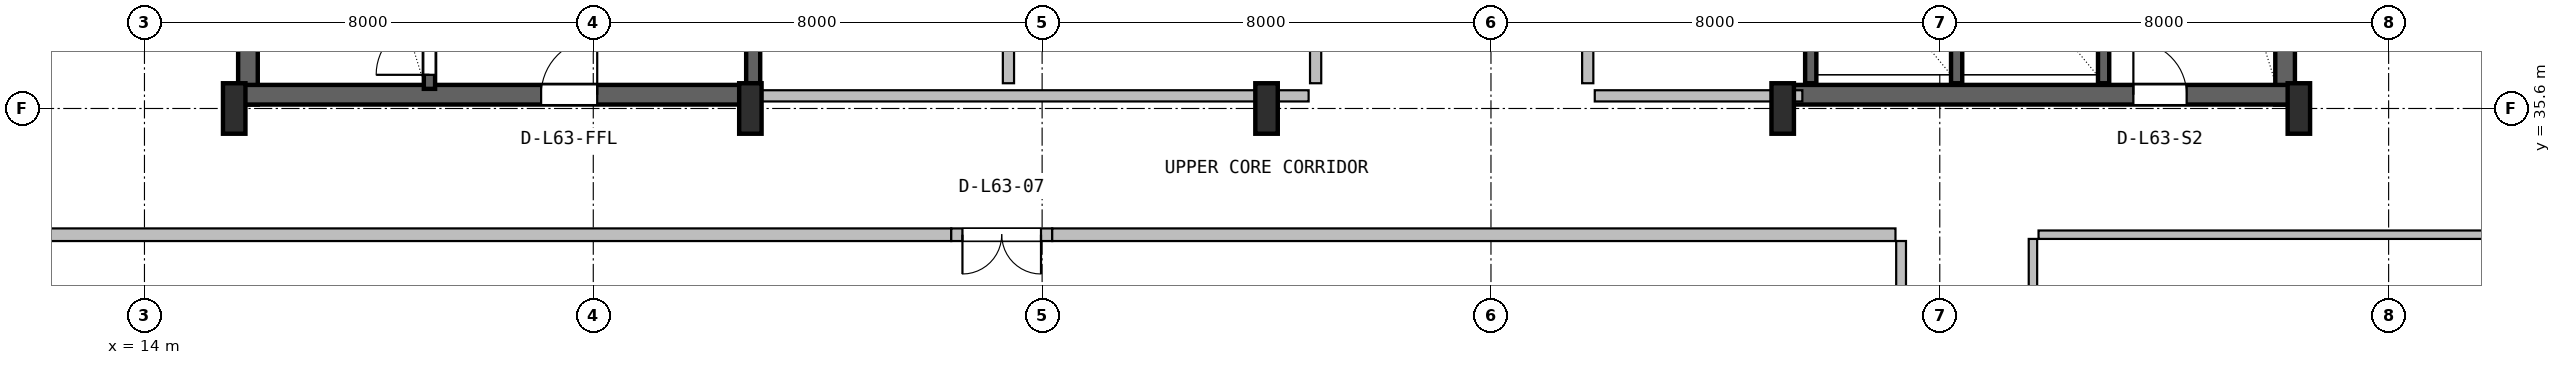
"""IFC4 building model, lengths in metres.
Left out: names, types, materials, properties, quantities, classifications, styles, units other than length and angle.
Written with IfcOpenShell. Run it as: python <this file> out.ifc"""

import sys

from ifc_helpers import new_model, si_unit, direction, frame, frame_2d, origin, origin_2d, place, context, subcontext, project, spatial, rectangle, i_section, extrude, source, transform, mapped, element, fill, save


model = new_model("IFC4")
c1 = context("Model", 3, precision=1e-05, world=origin(), true_north=direction((0.0, 1.0)))
c2 = subcontext(c1, "Body", "Model", "MODEL_VIEW")
j1 = project(units=[si_unit("LENGTHUNIT", "METRE"), si_unit("PLANEANGLEUNIT", "RADIAN")], contexts=[c1])
p1 = place(None, origin())
s1 = spatial("IfcSite", under=j1, at=p1, CompositionType="ELEMENT")
p2 = place(p1, origin())
s2 = spatial("IfcBuilding", under=s1, at=p2, CompositionType="ELEMENT")
p3 = place(p2, frame((0.0, 0.0, 254.6)))
s3 = spatial("IfcBuildingStorey", under=s2, at=p3, CompositionType="ELEMENT", Elevation=254.6)
for number, where, z_axis, x_axis in (
    (1, (15.845, 35.67, 0.0), (0.0, 0.0, 1.0), (0.0, 1.0, 0.0)),
    (2, (52.155, 35.67, 0.0), (0.0, 0.0, 1.0), (0.0, 1.0, 0.0)),
):
    element("IfcWall", number, at=place(p3, frame(where, z_axis=z_axis, x_axis=x_axis)), inside=s3, PredefinedType="SHEAR", context=c2, shape_type="SweptSolid", body=[
        extrude(rectangle(XDim=11.13, YDim=0.35, at=frame_2d((5.565, 0.0))), origin(), (0.0, 0.0, 1.0), 3.55),
    ])
p4 = place(p3, frame((15.67, 35.845, 0.0), z_axis=(0.0, 0.0, 1.0), x_axis=(1.0, 0.0, 0.0)))
e3 = element("IfcWall", 3, at=p4, inside=s3, PredefinedType="SHEAR", context=c2, shape_type="SweptSolid", body=[
    extrude(rectangle(XDim=9.13, YDim=0.35, at=frame_2d((4.565, 0.0))), origin(), (0.0, 0.0, 1.0), 3.55),
])
p5 = place(p4, frame((5.4, 0.0, 0.0)))
e4 = element("IfcOpeningElement", 4, at=p5, cuts=e3, PredefinedType="OPENING", context=c2, shape_type="SweptSolid", body=[
    extrude(rectangle(XDim=1.0, YDim=2.1, at=frame_2d((0.5, 1.05))), frame((0.0, 0.185, 0.0), z_axis=(0.0, -1.0, 0.0), x_axis=(1.0, 0.0, 0.0)), (0.0, 0.0, 1.0), 0.37),
])
p6 = place(p3, frame((43.2, 35.845, 0.0), z_axis=(0.0, 0.0, 1.0), x_axis=(1.0, 0.0, 0.0)))
e5 = element("IfcWall", 5, at=p6, inside=s3, PredefinedType="SHEAR", context=c2, shape_type="SweptSolid", body=[
    extrude(rectangle(XDim=9.13, YDim=0.35, at=frame_2d((4.565, 0.0))), origin(), (0.0, 0.0, 1.0), 3.55),
])
p7 = place(p6, frame((6.25, 0.0, 0.0)))
e6 = element("IfcOpeningElement", 6, at=p7, cuts=e5, PredefinedType="OPENING", context=c2, shape_type="SweptSolid", body=[
    extrude(rectangle(XDim=0.95, YDim=2.1, at=frame_2d((0.475, 1.05))), frame((0.0, 0.185, 0.0), z_axis=(0.0, -1.0, 0.0), x_axis=(1.0, 0.0, 0.0)), (0.0, 0.0, 1.0), 0.37),
])
m1 = source(origin(), c2, "Body", "SweptSolid", [
    extrude(i_section(OverallWidth=0.4, OverallDepth=0.9, WebThickness=0.016, FlangeThickness=0.028, FilletRadius=0.016, at=origin_2d()), origin(), (0.0, 0.0, 1.0), 3.8),
])
for number, where, z_axis, x_axis in (
    (7, (15.6, 35.6, 0.0), (0.0, 0.0, 1.0), (1.0, 0.0, 0.0)),
    (8, (24.8, 35.6, 0.0), (0.0, 0.0, 1.0), (1.0, 0.0, 0.0)),
    (9, (34.0, 35.6, 0.0), (0.0, 0.0, 1.0), (1.0, 0.0, 0.0)),
    (10, (43.2, 35.6, 0.0), (0.0, 0.0, 1.0), (1.0, 0.0, 0.0)),
    (11, (52.4, 35.6, 0.0), (0.0, 0.0, 1.0), (1.0, 0.0, 0.0)),
):
    element("IfcColumn", number, at=place(p3, frame(where, z_axis=z_axis, x_axis=x_axis)), inside=s3, PredefinedType="COLUMN", context=c2, shape_type="MappedRepresentation", body=[
        mapped(m1, transform((0.0, 0.0, 0.0), x_axis=(1.0, 0.0, 0.0), y_axis=(0.0, 1.0, 0.0), z_axis=(0.0, 0.0, 1.0), scale=1.0)),
    ])
p8 = place(p3, frame((19.08, 35.95, 0.0), z_axis=(0.0, 0.0, 1.0), x_axis=(0.0, 1.0, 0.0)))
e12 = element("IfcWall", 12, at=p8, inside=s3, PredefinedType="SHEAR", context=c2, shape_type="SweptSolid", body=[
    extrude(rectangle(XDim=9.65, YDim=0.2, at=frame_2d((4.825, 0.0))), origin(), (0.0, 0.0, 1.0), 3.55),
])
p9 = place(p8, frame((0.25, 0.0, 0.0)))
e13 = element("IfcOpeningElement", 13, at=p9, cuts=e12, PredefinedType="OPENING", context=c2, shape_type="SweptSolid", body=[
    extrude(rectangle(XDim=0.95, YDim=2.1, at=frame_2d((0.475, 1.05))), frame((0.0, 0.11, 0.0), z_axis=(0.0, -1.0, 0.0), x_axis=(1.0, 0.0, 0.0)), (0.0, 0.0, 1.0), 0.22),
])
p10 = place(p3, frame((24.85, 36.05, 0.0), z_axis=(0.0, 0.0, 1.0), x_axis=(0.0, 1.0, 0.0)))
e14 = element("IfcWall", 14, at=p10, inside=s3, PredefinedType="SHEAR", context=c2, shape_type="SweptSolid", body=[
    extrude(rectangle(XDim=10.45, YDim=0.25, at=frame_2d((5.225, 0.0))), origin(), (0.0, 0.0, 1.0), 3.55),
])
p11 = place(p3, frame((48.92, 36.05, 0.0), z_axis=(0.0, 0.0, 1.0), x_axis=(0.0, 1.0, 0.0)))
e15 = element("IfcWall", 15, at=p11, inside=s3, PredefinedType="SHEAR", context=c2, shape_type="SweptSolid", body=[
    extrude(rectangle(XDim=10.5, YDim=0.2, at=frame_2d((5.25, 0.0))), origin(), (0.0, 0.0, 1.0), 3.55),
])
for number, where, z_axis, x_axis in (
    (16, (43.7, 36.05, 0.0), (0.0, 0.0, 1.0), (0.0, 1.0, 0.0)),
    (17, (46.3, 36.05, 0.0), (0.0, 0.0, 1.0), (0.0, 1.0, 0.0)),
):
    element("IfcWall", number, at=place(p3, frame(where, z_axis=z_axis, x_axis=x_axis)), inside=s3, PredefinedType="SHEAR", context=c2, shape_type="SweptSolid", body=[
        extrude(rectangle(XDim=3.05, YDim=0.2, at=frame_2d((1.525, 0.0))), origin(), (0.0, 0.0, 1.0), 3.55),
    ])
p12 = place(p3, frame((25.0, 35.825, 0.0), z_axis=(0.0, 0.0, 1.0), x_axis=(1.0, 0.0, 0.0)))
e18 = element("IfcWall", 18, at=p12, inside=s3, PredefinedType="PLUMBINGWALL", context=c2, shape_type="SweptSolid", body=[
    extrude(rectangle(XDim=9.75, YDim=0.2, at=frame_2d((4.875, 0.0))), origin(), (0.0, 0.0, 1.0), 2.575),
])
for number, where, z_axis, x_axis in (
    (19, (29.4, 36.05, 0.0), (0.0, 0.0, 1.0), (0.0, 1.0, 0.0)),
    (20, (34.875, 36.05, 0.0), (0.0, 0.0, 1.0), (0.0, 1.0, 0.0)),
):
    element("IfcWall", number, at=place(p3, frame(where, z_axis=z_axis, x_axis=x_axis)), inside=s3, PredefinedType="PLUMBINGWALL", context=c2, shape_type="SweptSolid", body=[
        extrude(rectangle(XDim=3.1, YDim=0.2, at=frame_2d((1.55, 0.0))), origin(), (0.0, 0.0, 1.0), 3.53),
    ])
p13 = place(p3, frame((39.85, 35.825, 0.0), z_axis=(0.0, 0.0, 1.0), x_axis=(1.0, 0.0, 0.0)))
e21 = element("IfcWall", 21, at=p13, inside=s3, PredefinedType="SOLIDWALL", context=c2, shape_type="SweptSolid", body=[
    extrude(rectangle(XDim=3.7, YDim=0.2, at=frame_2d((1.85, 0.0))), origin(), (0.0, 0.0, 1.0), 2.575),
])
p14 = place(p3, frame((39.725, 36.05, 0.0), z_axis=(0.0, 0.0, 1.0), x_axis=(0.0, 1.0, 0.0)))
e22 = element("IfcWall", 22, at=p14, inside=s3, PredefinedType="SOLIDWALL", context=c2, shape_type="SweptSolid", body=[
    extrude(rectangle(XDim=3.1, YDim=0.2, at=frame_2d((1.55, 0.0))), origin(), (0.0, 0.0, 1.0), 3.53),
])
p15 = place(p3, frame((45.31, 26.595, 0.0), z_axis=(0.0, 0.0, 1.0), x_axis=(0.0, 1.0, 0.0)))
e23 = element("IfcWall", 23, at=p15, inside=s3, PredefinedType="PARTITIONING", context=c2, shape_type="SweptSolid", body=[
    extrude(rectangle(XDim=6.643, YDim=0.175, at=frame_2d((3.322, 0.0))), origin(), (0.0, 0.0, 1.0), 3.222),
])
p16 = place(p3, frame((9.68, 33.35, 0.0), z_axis=(0.0, 0.0, 1.0), x_axis=(1.0, 0.0, 0.0)))
e24 = element("IfcWall", 24, at=p16, inside=s3, PredefinedType="PARTITIONING", context=c2, shape_type="SweptSolid", body=[
    extrude(rectangle(XDim=18.7, YDim=0.225, at=frame_2d((9.35, 0.0))), origin(), (0.0, 0.0, 1.0), 1.925),
])
p17 = place(p3, frame((28.38, 33.35, 0.0), z_axis=(0.0, 0.0, 1.0), x_axis=(1.0, 0.0, 0.0)))
e25 = element("IfcWall", 25, at=p17, inside=s3, PredefinedType="PARTITIONING", context=c2, shape_type="SweptSolid", body=[
    extrude(rectangle(XDim=1.8, YDim=0.225, at=frame_2d((0.9, 0.0))), origin(), (0.0, 0.0, 1.0), 2.195),
])
p18 = place(p17, frame((0.2, 0.0, 0.0)))
e26 = element("IfcOpeningElement", 26, at=p18, cuts=e25, PredefinedType="OPENING", context=c2, shape_type="SweptSolid", body=[
    extrude(rectangle(XDim=1.4, YDim=2.12, at=frame_2d((0.7, 1.06))), frame((0.0, 0.123, 0.0), z_axis=(0.0, -1.0, 0.0), x_axis=(1.0, 0.0, 0.0)), (0.0, 0.0, 1.0), 0.245),
])
p19 = place(p3, frame((30.18, 33.35, 0.0), z_axis=(0.0, 0.0, 1.0), x_axis=(1.0, 0.0, 0.0)))
e27 = element("IfcWall", 27, at=p19, inside=s3, PredefinedType="PARTITIONING", context=c2, shape_type="SweptSolid", body=[
    extrude(rectangle(XDim=15.03, YDim=0.225, at=frame_2d((7.515, 0.0))), origin(), (0.0, 0.0, 1.0), 2.195),
])
p20 = place(p3, frame((47.76, 33.35, 0.0), z_axis=(0.0, 0.0, 1.0), x_axis=(1.0, 0.0, 0.0)))
e28 = element("IfcWall", 28, at=p20, inside=s3, PredefinedType="PARTITIONING", context=c2, shape_type="SweptSolid", body=[
    extrude(rectangle(XDim=10.56, YDim=0.15, at=frame_2d((5.28, 0.0))), origin(), (0.0, 0.0, 1.0), 1.925),
])
p21 = place(p3, frame((47.66, 29.205, 0.0), z_axis=(0.0, 0.0, 1.0), x_axis=(0.0, 1.0, 0.0)))
e29 = element("IfcWall", 29, at=p21, inside=s3, PredefinedType="PARTITIONING", context=c2, shape_type="SweptSolid", body=[
    extrude(rectangle(XDim=4.07, YDim=0.15, at=frame_2d((2.035, 0.0))), origin(), (0.0, 0.0, 1.0), 3.53),
])
m2 = source(origin(), c2, "Body", "SweptSolid", [
    extrude(rectangle(XDim=0.95, YDim=2.1, at=frame_2d((0.475, 1.05))), frame((0.0, 0.025, 0.0), z_axis=(0.0, -1.0, 0.0), x_axis=(1.0, 0.0, 0.0)), (0.0, 0.0, 1.0), 0.05),
])
p22 = place(p9, origin())
e30 = element("IfcDoor", 30, at=p22, inside=s3, OperationType="SINGLE_SWING_LEFT", PredefinedType="DOOR", context=c2, shape_type="MappedRepresentation", body=[
    mapped(m2, transform((0.0, 0.0, 0.0), x_axis=(1.0, 0.0, 0.0), y_axis=(0.0, 1.0, 0.0), z_axis=(0.0, 0.0, 1.0), scale=1.0)),
])
fill(e13, e30)
m3 = source(origin(), c2, "Body", "SweptSolid", [
    extrude(rectangle(XDim=1.0, YDim=2.1, at=frame_2d((0.5, 1.05))), frame((0.0, 0.025, 0.0), z_axis=(0.0, -1.0, 0.0), x_axis=(1.0, 0.0, 0.0)), (0.0, 0.0, 1.0), 0.05),
])
p23 = place(p5, origin())
e31 = element("IfcDoor", 31, at=p23, inside=s3, OperationType="SINGLE_SWING_RIGHT", PredefinedType="DOOR", context=c2, shape_type="MappedRepresentation", body=[
    mapped(m3, transform((0.0, 0.0, 0.0), x_axis=(1.0, 0.0, 0.0), y_axis=(0.0, 1.0, 0.0), z_axis=(0.0, 0.0, 1.0), scale=1.0)),
])
fill(e4, e31)
p24 = place(p7, origin())
e32 = element("IfcDoor", 32, at=p24, inside=s3, OperationType="SINGLE_SWING_LEFT", PredefinedType="DOOR", context=c2, shape_type="MappedRepresentation", body=[
    mapped(m2, transform((0.0, 0.0, 0.0), x_axis=(1.0, 0.0, 0.0), y_axis=(0.0, 1.0, 0.0), z_axis=(0.0, 0.0, 1.0), scale=1.0)),
])
fill(e6, e32)
m4 = source(origin(), c2, "Body", "SweptSolid", [
    extrude(rectangle(XDim=1.4, YDim=2.12, at=frame_2d((0.7, 1.06))), frame((0.0, 0.025, 0.0), z_axis=(0.0, -1.0, 0.0), x_axis=(1.0, 0.0, 0.0)), (0.0, 0.0, 1.0), 0.05),
])
p25 = place(p18, frame((1.4, 0.0, 0.0), z_axis=(0.0, 0.0, 1.0), x_axis=(-1.0, 0.0, 0.0)))
e33 = element("IfcDoor", 33, at=p25, inside=s3, OperationType="DOUBLE_DOOR_SINGLE_SWING", PredefinedType="DOOR", context=c2, shape_type="MappedRepresentation", body=[
    mapped(m4, transform((0.0, 0.0, 0.0), x_axis=(1.0, 0.0, 0.0), y_axis=(0.0, 1.0, 0.0), z_axis=(0.0, 0.0, 1.0), scale=1.0)),
])
fill(e26, e33)
save(model, sys.argv[1])
